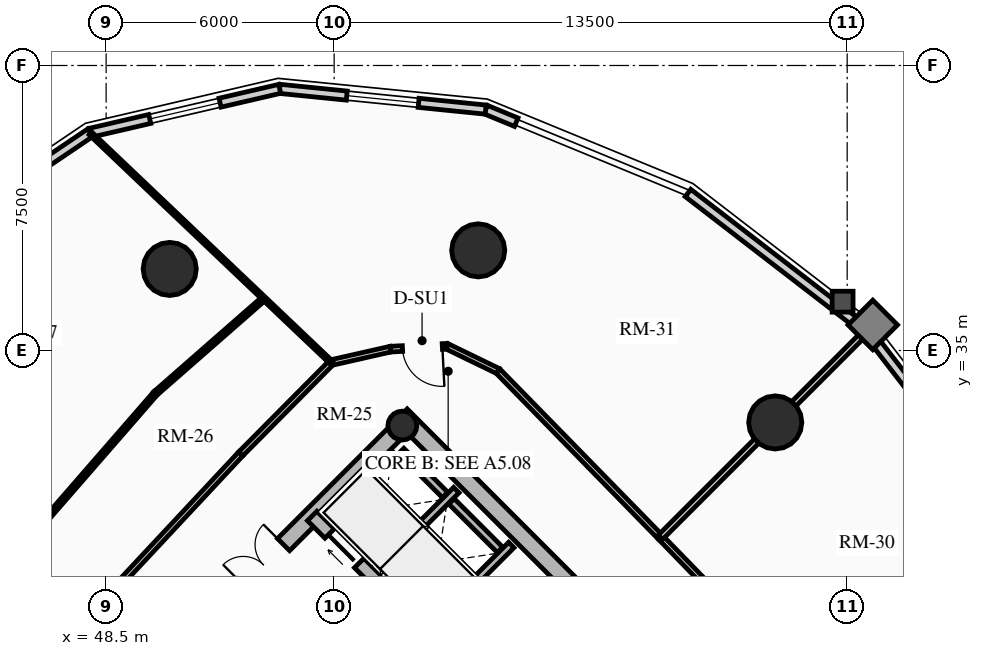
"""IFC4 building model, lengths in metres.
Left out: names, types, materials, properties, quantities, classifications, styles, units other than length and angle.
Written with IfcOpenShell. Run it as: python <this file> out.ifc"""

import sys

from ifc_helpers import new_model, si_unit, direction, frame, frame_2d, origin, origin_2d, place, context, subcontext, project, spatial, rectangle, circle, hollow_circle, extrude, source, transform, mapped, element, fill, save


model = new_model("IFC4")
c1 = context("Model", 3, precision=1e-05, world=origin(), true_north=direction((0.0, 1.0)))
c2 = subcontext(c1, "Body", "Model", "MODEL_VIEW")
j1 = project(units=[si_unit("LENGTHUNIT", "METRE"), si_unit("PLANEANGLEUNIT", "RADIAN")], contexts=[c1])
p1 = place(None, origin())
s1 = spatial("IfcSite", under=j1, at=p1, CompositionType="ELEMENT")
p2 = place(p1, origin())
s2 = spatial("IfcBuilding", under=s1, at=p2, CompositionType="ELEMENT")
p3 = place(p2, frame((0.0, 0.0, 129.16)))
s3 = spatial("IfcBuildingStorey", under=s2, at=p3, CompositionType="ELEMENT", Elevation=129.16)
p4 = place(p3, frame((66.303, 23.263, 0.0), z_axis=(0.0, 0.0, 1.0), x_axis=(-0.707106781187, 0.707106781187, 0.0)))
e1 = element("IfcWall", 1, at=p4, inside=s3, PredefinedType="SHEAR", context=c2, shape_type="SweptSolid", body=[
    extrude(rectangle(XDim=14.2, YDim=0.45, at=frame_2d((7.1, 0.0))), origin(), (0.0, 0.0, 1.0), 3.72),
])
p5 = place(p3, frame((48.856, 25.578, 0.0), z_axis=(0.0, 0.0, 1.0), x_axis=(0.707106781187, 0.707106781187, 0.0)))
e2 = element("IfcWall", 2, at=p5, inside=s3, PredefinedType="SHEAR", context=c2, shape_type="SweptSolid", body=[
    extrude(rectangle(XDim=10.7, YDim=0.45, at=frame_2d((5.35, 0.0))), origin(), (0.0, 0.0, 1.0), 3.72),
])
m1 = source(origin(), c2, "Body", "SweptSolid", [
    extrude(rectangle(XDim=1.5, YDim=2.02, at=frame_2d((0.75, 1.01))), frame((0.0, 0.235, 0.0), z_axis=(0.0, -1.0, 0.0), x_axis=(1.0, 0.0, 0.0)), (0.0, 0.0, 1.0), 0.47),
])
p6 = place(p5, frame((4.6, 0.0, 0.0)))
e3 = element("IfcOpeningElement", 3, at=p6, cuts=e2, PredefinedType="OPENING", context=c2, shape_type="MappedRepresentation", body=[
    mapped(m1, transform((0.0, 0.0, 0.0), x_axis=(1.0, 0.0, 0.0), y_axis=(0.0, 1.0, 0.0), z_axis=(0.0, 0.0, 1.0), scale=1.0)),
])
p7 = place(p3, frame((63.645, 20.922, 0.0), z_axis=(0.0, 0.0, 1.0), x_axis=(-0.707106781187, 0.707106781187, 0.0)))
e4 = element("IfcWall", 4, at=p7, inside=s3, PredefinedType="SHEAR", context=c2, shape_type="SweptSolid", body=[
    extrude(rectangle(XDim=13.75, YDim=0.35, at=frame_2d((6.875, 0.0))), origin(), (0.0, 0.0, 1.0), 3.72),
])
m2 = source(origin(), c2, "Body", "SweptSolid", [
    extrude(rectangle(XDim=1.1, YDim=2.015, at=frame_2d((0.55, 1.007))), frame((0.0, 0.185, 0.0), z_axis=(0.0, -1.0, 0.0), x_axis=(1.0, 0.0, 0.0)), (0.0, 0.0, 1.0), 0.37),
])
p8 = place(p7, frame((10.0, 0.0, 0.0)))
e5 = element("IfcOpeningElement", 5, at=p8, cuts=e4, PredefinedType="OPENING", context=c2, shape_type="MappedRepresentation", body=[
    mapped(m2, transform((0.0, 0.0, 0.0), x_axis=(1.0, 0.0, 0.0), y_axis=(0.0, 1.0, 0.0), z_axis=(0.0, 0.0, 1.0), scale=1.0)),
])
p9 = place(p7, frame((12.0, 0.0, 0.0)))
e6 = element("IfcOpeningElement", 6, at=p9, cuts=e4, PredefinedType="OPENING", context=c2, shape_type="MappedRepresentation", body=[
    mapped(m2, transform((0.0, 0.0, 0.0), x_axis=(1.0, 0.0, 0.0), y_axis=(0.0, 1.0, 0.0), z_axis=(0.0, 0.0, 1.0), scale=1.0)),
])
m3 = source(origin(), c2, "Body", "SweptSolid", [
    extrude(rectangle(XDim=1.15, YDim=2.02, at=frame_2d((0.575, 1.01))), frame((0.0, 0.185, 0.0), z_axis=(0.0, -1.0, 0.0), x_axis=(1.0, 0.0, 0.0)), (0.0, 0.0, 1.0), 0.37),
])
p10 = place(p7, frame((5.305, 0.0, 0.0)))
e7 = element("IfcOpeningElement", 7, at=p10, cuts=e4, PredefinedType="OPENING", context=c2, shape_type="MappedRepresentation", body=[
    mapped(m3, transform((0.0, 0.0, 0.0), x_axis=(1.0, 0.0, 0.0), y_axis=(0.0, 1.0, 0.0), z_axis=(0.0, 0.0, 1.0), scale=1.0)),
])
p11 = place(p3, frame((56.294, 33.024, 0.0), z_axis=(0.0, 0.0, 1.0), x_axis=(0.707106781187, 0.707106781187, 0.0)))
e8 = element("IfcColumn", 8, at=p11, inside=s3, PredefinedType="COLUMN", context=c2, shape_type="SweptSolid", body=[
    extrude(hollow_circle(Radius=0.38, WallThickness=0.032, at=origin_2d()), origin(), (0.0, 0.0, 1.0), 3.72),
])
for number, where, z_axis, x_axis in (
    (9, (66.107, 33.107, 0.0), (0.0, 0.0, 1.0), (1.0, 0.0, 0.0)),
    (10, (58.291, 37.635, 0.0), (0.0, 0.0, 1.0), (1.0, 0.0, 0.0)),
    (11, (50.173, 37.146, 0.0), (0.0, 0.0, 1.0), (1.0, 0.0, 0.0)),
):
    element("IfcColumn", number, at=place(p3, frame(where, z_axis=z_axis, x_axis=x_axis)), inside=s3, PredefinedType="USERDEFINED", context=c2, shape_type="SweptSolid", body=[
        extrude(circle(Radius=0.7, at=origin_2d()), origin(), (0.0, 0.0, 1.0), 3.72),
    ])
p12 = place(p3, frame((63.811, 39.145, 0.0), z_axis=(0.0, 0.0, 1.0), x_axis=(0.791982052206, -0.61054437102, 0.0)))
e12 = element("IfcWall", 12, at=p12, inside=s3, PredefinedType="SOLIDWALL", context=c2, shape_type="SweptSolid", body=[
    extrude(rectangle(XDim=5.942, YDim=0.24, at=frame_2d((2.971, 0.0))), origin(), (0.0, 0.0, 1.0), 2.949),
])
p13 = place(p3, frame((58.487, 41.339, 0.0), z_axis=(0.0, 0.0, 1.0), x_axis=(0.924556017656, -0.381046152345, 0.0)))
e13 = element("IfcWall", 13, at=p13, inside=s3, PredefinedType="SOLIDWALL", context=c2, shape_type="SweptSolid", body=[
    extrude(rectangle(XDim=0.87, YDim=0.24, at=frame_2d((0.435, 0.0))), origin(), (0.0, 0.0, 1.0), 2.949),
])
p14 = place(p3, frame((53.067, 41.885, 0.0), z_axis=(0.0, 0.0, 1.0), x_axis=(0.994971754311, -0.10015591906, 0.0)))
e14 = element("IfcWall", 14, at=p14, inside=s3, PredefinedType="SOLIDWALL", context=c2, shape_type="SweptSolid", body=[
    extrude(rectangle(XDim=5.448, YDim=0.24, at=frame_2d((2.724, 0.0))), origin(), (0.0, 0.0, 1.0), 2.949),
])
m4 = source(origin(), c2, "Body", "SweptSolid", [
    extrude(rectangle(XDim=1.9, YDim=1.35, at=frame_2d((0.95, 0.675))), frame((0.0, 0.13, 0.0), z_axis=(0.0, -1.0, 0.0), x_axis=(1.0, 0.0, 0.0)), (0.0, 0.0, 1.0), 0.26),
])
p15 = place(p14, frame((1.774, 0.0, 0.65)))
e15 = element("IfcOpeningElement", 15, at=p15, cuts=e14, PredefinedType="OPENING", context=c2, shape_type="MappedRepresentation", body=[
    mapped(m4, transform((0.0, 0.0, 0.0), x_axis=(1.0, 0.0, 0.0), y_axis=(0.0, 1.0, 0.0), z_axis=(0.0, 0.0, 1.0), scale=1.0)),
])
p16 = place(p3, frame((48.08, 40.729, 0.0), z_axis=(0.0, 0.0, 1.0), x_axis=(0.974165631126, 0.225834725257, 0.0)))
e16 = element("IfcWall", 16, at=p16, inside=s3, PredefinedType="SOLIDWALL", context=c2, shape_type="SweptSolid", body=[
    extrude(rectangle(XDim=5.119, YDim=0.24, at=frame_2d((2.56, 0.0))), origin(), (0.0, 0.0, 1.0), 2.949),
])
p17 = place(p16, frame((1.609, 0.0, 0.65)))
e17 = element("IfcOpeningElement", 17, at=p17, cuts=e16, PredefinedType="OPENING", context=c2, shape_type="MappedRepresentation", body=[
    mapped(m4, transform((0.0, 0.0, 0.0), x_axis=(1.0, 0.0, 0.0), y_axis=(0.0, 1.0, 0.0), z_axis=(0.0, 0.0, 1.0), scale=1.0)),
])
p18 = place(p3, frame((44.015, 37.985, 0.0), z_axis=(0.0, 0.0, 1.0), x_axis=(0.828781148131, 0.559572880421, 0.0)))
e18 = element("IfcWall", 18, at=p18, inside=s3, PredefinedType="SOLIDWALL", context=c2, shape_type="SweptSolid", body=[
    extrude(rectangle(XDim=4.905, YDim=0.24, at=frame_2d((2.452, 0.0))), origin(), (0.0, 0.0, 1.0), 2.949),
])
p19 = place(p3, frame((68.517, 35.517, 0.0), z_axis=(0.0, 0.0, 1.0), x_axis=(0.61054437102, -0.791982052206, 0.0)))
e19 = element("IfcWall", 19, at=p19, inside=s3, PredefinedType="SOLIDWALL", context=c2, shape_type="SweptSolid", body=[
    extrude(rectangle(XDim=5.942, YDim=0.24, at=frame_2d((2.971, 0.0))), origin(), (0.0, 0.0, 1.0), 2.949),
])
m5 = source(origin(), c2, "Body", "SweptSolid", [
    extrude(rectangle(XDim=2.2, YDim=1.35, at=frame_2d((1.1, 0.675))), frame((0.0, 0.13, 0.0), z_axis=(0.0, -1.0, 0.0), x_axis=(1.0, 0.0, 0.0)), (0.0, 0.0, 1.0), 0.26),
])
p20 = place(p19, frame((1.871, 0.0, 0.65)))
e20 = element("IfcOpeningElement", 20, at=p20, cuts=e19, PredefinedType="OPENING", context=c2, shape_type="MappedRepresentation", body=[
    mapped(m5, transform((0.0, 0.0, 0.0), x_axis=(1.0, 0.0, 0.0), y_axis=(0.0, 1.0, 0.0), z_axis=(0.0, 0.0, 1.0), scale=1.0)),
])
p21 = place(p3, frame((57.062, 27.781, 0.0), z_axis=(0.0, 0.0, 1.0), x_axis=(0.707106781187, 0.707106781187, 0.0)))
e21 = element("IfcWall", 21, at=p21, inside=s3, PredefinedType="SHEAR", context=c2, shape_type="SweptSolid", body=[
    extrude(rectangle(XDim=2.97, YDim=0.2, at=frame_2d((1.485, 0.0))), origin(), (0.0, 0.0, 1.0), 3.72),
])
p22 = place(p3, frame((55.615, 29.227, 0.0), z_axis=(0.0, 0.0, 1.0), x_axis=(0.707147878904, 0.70706568108, 0.0)))
e22 = element("IfcWall", 22, at=p22, inside=s3, PredefinedType="SHEAR", context=c2, shape_type="SweptSolid", body=[
    extrude(rectangle(XDim=2.97, YDim=0.2, at=frame_2d((1.485, 0.0))), origin(), (0.0, 0.0, 1.0), 3.72),
])
p23 = place(p3, frame((58.865, 29.754, 0.0), z_axis=(0.0, 0.0, 1.0), x_axis=(-0.707174411312, 0.707039144592, 0.0)))
e23 = element("IfcWall", 23, at=p23, inside=s3, PredefinedType="SHEAR", context=c2, shape_type="SweptSolid", body=[
    extrude(rectangle(XDim=1.805, YDim=0.2, at=frame_2d((0.902, 0.0))), origin(), (0.0, 0.0, 1.0), 3.72),
])
p24 = place(p3, frame((57.419, 31.2, 0.0), z_axis=(0.0, 0.0, 1.0), x_axis=(-0.707032117043, 0.707181437447, 0.0)))
e24 = element("IfcWall", 24, at=p24, inside=s3, PredefinedType="SHEAR", context=c2, shape_type="SweptSolid", body=[
    extrude(rectangle(XDim=1.635, YDim=0.2, at=frame_2d((0.817, 0.0))), origin(), (0.0, 0.0, 1.0), 3.72),
])
p25 = place(p3, frame((63.086, 30.086, 0.0), z_axis=(0.0, 0.0, 1.0), x_axis=(-0.699075897379, 0.715047473741, 0.0)))
e25 = element("IfcWall", 25, at=p25, inside=s3, PredefinedType="PARTITIONING", context=c2, shape_type="SweptSolid", body=[
    extrude(rectangle(XDim=6.114, YDim=0.15, at=frame_2d((3.057, 0.0))), origin(), (0.0, 0.0, 1.0), 2.995),
])
p26 = place(p3, frame((58.812, 34.458, 0.0), z_axis=(0.0, 0.0, 1.0), x_axis=(-0.899559490277, 0.436798264021, 0.0)))
e26 = element("IfcWall", 26, at=p26, inside=s3, PredefinedType="PARTITIONING", context=c2, shape_type="SweptSolid", body=[
    extrude(rectangle(XDim=1.495, YDim=0.15, at=frame_2d((0.748, 0.0))), origin(), (0.0, 0.0, 1.0), 2.995),
])
p27 = place(p3, frame((57.467, 35.111, 0.0), z_axis=(0.0, 0.0, 1.0), x_axis=(-0.998691757323, -0.051134859488, 0.0)))
e27 = element("IfcWall", 27, at=p27, inside=s3, PredefinedType="PARTITIONING", context=c2, shape_type="SweptSolid", body=[
    extrude(rectangle(XDim=1.485, YDim=0.15, at=frame_2d((0.742, 0.0))), origin(), (0.0, 0.0, 1.0), 2.995),
])
m6 = source(origin(), c2, "Body", "SweptSolid", [
    extrude(rectangle(XDim=1.05, YDim=2.015, at=frame_2d((0.525, 1.007))), frame((0.0, 0.085, 0.0), z_axis=(0.0, -1.0, 0.0), x_axis=(1.0, 0.0, 0.0)), (0.0, 0.0, 1.0), 0.17),
])
p28 = place(p27, frame((0.12, 0.0, 0.0)))
e28 = element("IfcOpeningElement", 28, at=p28, cuts=e27, PredefinedType="OPENING", context=c2, shape_type="MappedRepresentation", body=[
    mapped(m6, transform((0.0, 0.0, 0.0), x_axis=(1.0, 0.0, 0.0), y_axis=(0.0, 1.0, 0.0), z_axis=(0.0, 0.0, 1.0), scale=1.0)),
])
p29 = place(p3, frame((55.984, 35.035, 0.0), z_axis=(0.0, 0.0, 1.0), x_axis=(-0.975290305708, -0.22092718165, 0.0)))
e29 = element("IfcWall", 29, at=p29, inside=s3, PredefinedType="PARTITIONING", context=c2, shape_type="SweptSolid", body=[
    extrude(rectangle(XDim=1.597, YDim=0.15, at=frame_2d((0.798, 0.0))), origin(), (0.0, 0.0, 1.0), 2.995),
])
p30 = place(p3, frame((54.427, 34.683, 0.0), z_axis=(0.0, 0.0, 1.0), x_axis=(-0.704178989986, -0.710022499687, 0.0)))
e30 = element("IfcWall", 30, at=p30, inside=s3, PredefinedType="PARTITIONING", context=c2, shape_type="SweptSolid", body=[
    extrude(rectangle(XDim=3.384, YDim=0.15, at=frame_2d((1.692, 0.0))), origin(), (0.0, 0.0, 1.0), 2.995),
])
p31 = place(p3, frame((52.043, 32.28, 0.0), z_axis=(0.0, 0.0, 1.0), x_axis=(-0.682606081633, -0.730786519661, 0.0)))
e31 = element("IfcWall", 31, at=p31, inside=s3, PredefinedType="PARTITIONING", context=c2, shape_type="SweptSolid", body=[
    extrude(rectangle(XDim=6.527, YDim=0.15, at=frame_2d((3.263, 0.0))), origin(), (0.0, 0.0, 1.0), 2.995),
])
p32 = place(p3, frame((67.27, 25.78, 0.0), z_axis=(0.0, 0.0, 1.0), x_axis=(-0.696847842907, 0.717218992942, 0.0)))
e32 = element("IfcWall", 32, at=p32, inside=s3, PredefinedType="PARTITIONING", context=c2, shape_type="SweptSolid", body=[
    extrude(rectangle(XDim=6.004, YDim=0.15, at=frame_2d((3.002, 0.0))), origin(), (0.0, 0.0, 1.0), 3.425),
])
p33 = place(p3, frame((63.086, 30.086, 0.0), z_axis=(0.0, 0.0, 1.0), x_axis=(0.707106781187, 0.707106781187, 0.0)))
e33 = element("IfcWall", 33, at=p33, inside=s3, PredefinedType="PARTITIONING", context=c2, shape_type="SweptSolid", body=[
    extrude(rectangle(XDim=7.661, YDim=0.16, at=frame_2d((3.831, 0.0))), origin(), (0.0, 0.0, 1.0), 2.949),
])
p34 = place(p3, frame((54.427, 34.683, 0.0), z_axis=(0.0, 0.0, 1.0), x_axis=(-0.72454072322, 0.689231993161, 0.0)))
e34 = element("IfcWall", 34, at=p34, inside=s3, PredefinedType="MOVABLE", context=c2, shape_type="SweptSolid", body=[
    extrude(rectangle(XDim=8.747, YDim=0.1, at=frame_2d((4.374, 0.0))), origin(), (0.0, 0.0, 1.0), 2.949),
])
p35 = place(p3, frame((52.652, 36.371, 0.0), z_axis=(0.0, 0.0, 1.0), x_axis=(-0.752401146533, -0.658705180408, 0.0)))
e35 = element("IfcWall", 35, at=p35, inside=s3, PredefinedType="PARTITIONING", context=c2, shape_type="SweptSolid", body=[
    extrude(rectangle(XDim=3.791, YDim=0.125, at=frame_2d((1.896, 0.0))), origin(), (0.0, 0.0, 1.0), 2.995),
])
p36 = place(p3, frame((49.8, 33.873, 0.0), z_axis=(0.0, 0.0, 1.0), x_axis=(-0.656224613926, -0.754565607537, 0.0)))
e36 = element("IfcWall", 36, at=p36, inside=s3, PredefinedType="PARTITIONING", context=c2, shape_type="SweptSolid", body=[
    extrude(rectangle(XDim=6.058, YDim=0.125, at=frame_2d((3.029, 0.0))), origin(), (0.0, 0.0, 1.0), 2.995),
])
m7 = source(origin(), c2, "Body", "SweptSolid", [
    extrude(rectangle(XDim=1.9, YDim=1.35, at=frame_2d((0.95, 0.675))), frame((0.0, 0.03, 0.0), z_axis=(0.0, -1.0, 0.0), x_axis=(1.0, 0.0, 0.0)), (0.0, 0.0, 1.0), 0.06),
])
p37 = place(p15, origin())
e37 = element("IfcWindow", 37, at=p37, inside=s3, PartitioningType="DOUBLE_PANEL_VERTICAL", PredefinedType="WINDOW", context=c2, shape_type="MappedRepresentation", body=[
    mapped(m7, transform((0.0, 0.0, 0.0), x_axis=(1.0, 0.0, 0.0), y_axis=(0.0, 1.0, 0.0), z_axis=(0.0, 0.0, 1.0), scale=1.0)),
])
fill(e15, e37)
p38 = place(p17, origin())
e38 = element("IfcWindow", 38, at=p38, inside=s3, PartitioningType="DOUBLE_PANEL_VERTICAL", PredefinedType="WINDOW", context=c2, shape_type="MappedRepresentation", body=[
    mapped(m7, transform((0.0, 0.0, 0.0), x_axis=(1.0, 0.0, 0.0), y_axis=(0.0, 1.0, 0.0), z_axis=(0.0, 0.0, 1.0), scale=1.0)),
])
fill(e17, e38)
m8 = source(origin(), c2, "Body", "SweptSolid", [
    extrude(rectangle(XDim=1.1, YDim=2.015, at=frame_2d((0.55, 1.007))), frame((0.0, 0.025, 0.0), z_axis=(0.0, -1.0, 0.0), x_axis=(1.0, 0.0, 0.0)), (0.0, 0.0, 1.0), 0.05),
])
p39 = place(p9, origin())
e39 = element("IfcDoor", 39, at=p39, inside=s3, OperationType="SLIDING_TO_RIGHT", PredefinedType="DOOR", context=c2, shape_type="MappedRepresentation", body=[
    mapped(m8, transform((0.0, 0.0, 0.0), x_axis=(1.0, 0.0, 0.0), y_axis=(0.0, 1.0, 0.0), z_axis=(0.0, 0.0, 1.0), scale=1.0)),
])
fill(e6, e39)
m9 = source(origin(), c2, "Body", "SweptSolid", [
    extrude(rectangle(XDim=1.5, YDim=2.02, at=frame_2d((0.75, 1.01))), frame((0.0, 0.025, 0.0), z_axis=(0.0, -1.0, 0.0), x_axis=(1.0, 0.0, 0.0)), (0.0, 0.0, 1.0), 0.05),
])
p40 = place(p6, origin())
e40 = element("IfcDoor", 40, at=p40, inside=s3, OperationType="DOUBLE_DOOR_SINGLE_SWING", PredefinedType="DOOR", context=c2, shape_type="MappedRepresentation", body=[
    mapped(m9, transform((0.0, 0.0, 0.0), x_axis=(1.0, 0.0, 0.0), y_axis=(0.0, 1.0, 0.0), z_axis=(0.0, 0.0, 1.0), scale=1.0)),
])
fill(e3, e40)
m10 = source(origin(), c2, "Body", "SweptSolid", [
    extrude(rectangle(XDim=1.05, YDim=2.015, at=frame_2d((0.525, 1.007))), frame((0.0, 0.025, 0.0), z_axis=(0.0, -1.0, 0.0), x_axis=(1.0, 0.0, 0.0)), (0.0, 0.0, 1.0), 0.05),
])
p41 = place(p28, origin())
e41 = element("IfcDoor", 41, at=p41, inside=s3, OperationType="SINGLE_SWING_LEFT", PredefinedType="DOOR", context=c2, shape_type="MappedRepresentation", body=[
    mapped(m10, transform((0.0, 0.0, 0.0), x_axis=(1.0, 0.0, 0.0), y_axis=(0.0, 1.0, 0.0), z_axis=(0.0, 0.0, 1.0), scale=1.0)),
])
fill(e28, e41)
save(model, sys.argv[1])
